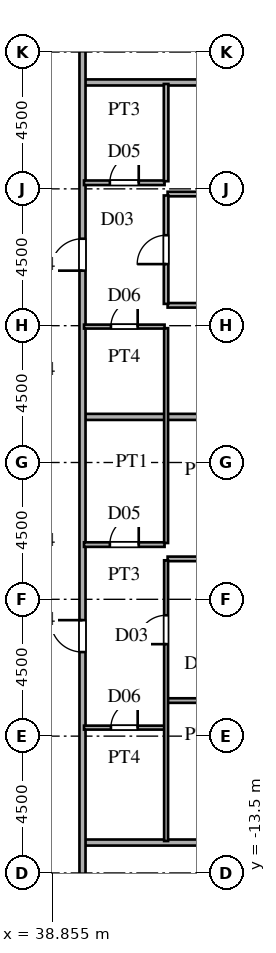
"""IFC4 building model, lengths in metres.
Left out: names, types, materials, properties, quantities, classifications, styles, units other than length and angle.
Written with IfcOpenShell. Run it as: python <this file> out.ifc"""

import sys

from ifc_helpers import new_model, si_unit, direction, frame, frame_2d, origin, place, context, subcontext, project, spatial, rectangle, extrude, source, transform, mapped, element, fill, save


model = new_model("IFC4")
c1 = context("Model", 3, precision=1e-05, world=origin(), true_north=direction((0.0, 1.0)))
c2 = subcontext(c1, "Body", "Model", "MODEL_VIEW")
j1 = project(units=[si_unit("LENGTHUNIT", "METRE"), si_unit("PLANEANGLEUNIT", "RADIAN")], contexts=[c1])
p1 = place(None, origin())
s1 = spatial("IfcSite", under=j1, at=p1, CompositionType="ELEMENT")
p2 = place(p1, origin())
s2 = spatial("IfcBuilding", under=s1, at=p2, CompositionType="ELEMENT")
p3 = place(p2, frame((0.0, 0.0, 51.3)))
s3 = spatial("IfcBuildingStorey", under=s2, at=p3, CompositionType="ELEMENT", Elevation=51.3)
p4 = place(p3, frame((39.93, -12.5, 0.0), z_axis=(0.0, 0.0, 1.0), x_axis=(1.0, 0.0, 0.0)))
e1 = element("IfcWall", 1, at=p4, inside=s3, PredefinedType="PARTITIONING", context=c2, shape_type="SweptSolid", body=[
    extrude(rectangle(XDim=26.407, YDim=0.2, at=frame_2d((13.204, 0.0))), origin(), (0.0, 0.0, 1.0), 3.38),
])
p5 = place(p3, frame((39.9, -8.72, 0.0), z_axis=(0.0, 0.0, 1.0), x_axis=(1.0, 0.0, 0.0)))
e2 = element("IfcWall", 2, at=p5, inside=s3, PredefinedType="PARTITIONING", context=c2, shape_type="SweptSolid", body=[
    extrude(rectangle(XDim=2.65, YDim=0.13, at=frame_2d((1.325, 0.0))), origin(), (0.0, 0.0, 1.0), 3.38),
])
p6 = place(p5, frame((0.885, 0.0, 0.0)))
e3 = element("IfcOpeningElement", 3, at=p6, cuts=e2, PredefinedType="OPENING", context=c2, shape_type="SweptSolid", body=[
    extrude(rectangle(XDim=0.88, YDim=2.1, at=frame_2d((0.44, 1.05))), frame((0.0, 0.075, 0.0), z_axis=(0.0, -1.0, 0.0), x_axis=(1.0, 0.0, 0.0)), (0.0, 0.0, 1.0), 0.15),
])
p7 = place(p3, frame((42.65, -7.83, 0.0), z_axis=(0.0, 0.0, 1.0), x_axis=(1.0, 0.0, 0.0)))
e4 = element("IfcWall", 4, at=p7, inside=s3, PredefinedType="PARTITIONING", context=c2, shape_type="SweptSolid", body=[
    extrude(rectangle(XDim=29.885, YDim=0.15, at=frame_2d((14.942, 0.0))), origin(), (0.0, 0.0, 1.0), 3.38),
])
p8 = place(p7, frame((5.425, 0.0, 0.0)))
e5 = element("IfcOpeningElement", 5, at=p8, cuts=e4, PredefinedType="OPENING", context=c2, shape_type="SweptSolid", body=[
    extrude(rectangle(XDim=0.95, YDim=2.15, at=frame_2d((0.475, 1.075))), frame((0.0, 0.085, 0.0), z_axis=(0.0, -1.0, 0.0), x_axis=(1.0, 0.0, 0.0)), (0.0, 0.0, 1.0), 0.17),
])
p9 = place(p7, frame((14.225, 0.0, 0.0)))
e6 = element("IfcOpeningElement", 6, at=p9, cuts=e4, PredefinedType="OPENING", context=c2, shape_type="SweptSolid", body=[
    extrude(rectangle(XDim=0.95, YDim=2.15, at=frame_2d((0.475, 1.075))), frame((0.0, 0.085, 0.0), z_axis=(0.0, -1.0, 0.0), x_axis=(1.0, 0.0, 0.0)), (0.0, 0.0, 1.0), 0.17),
])
p10 = place(p3, frame((42.65, -3.17, 0.0), z_axis=(0.0, 0.0, 1.0), x_axis=(1.0, 0.0, 0.0)))
e7 = element("IfcWall", 7, at=p10, inside=s3, PredefinedType="PARTITIONING", context=c2, shape_type="SweptSolid", body=[
    extrude(rectangle(XDim=29.885, YDim=0.15, at=frame_2d((14.942, 0.0))), origin(), (0.0, 0.0, 1.0), 3.38),
])
p11 = place(p10, frame((5.425, 0.0, 0.0)))
e8 = element("IfcOpeningElement", 8, at=p11, cuts=e7, PredefinedType="OPENING", context=c2, shape_type="SweptSolid", body=[
    extrude(rectangle(XDim=0.95, YDim=2.15, at=frame_2d((0.475, 1.075))), frame((0.0, 0.085, 0.0), z_axis=(0.0, -1.0, 0.0), x_axis=(1.0, 0.0, 0.0)), (0.0, 0.0, 1.0), 0.17),
])
p12 = place(p10, frame((14.225, 0.0, 0.0)))
e9 = element("IfcOpeningElement", 9, at=p12, cuts=e7, PredefinedType="OPENING", context=c2, shape_type="SweptSolid", body=[
    extrude(rectangle(XDim=0.95, YDim=2.15, at=frame_2d((0.475, 1.075))), frame((0.0, 0.085, 0.0), z_axis=(0.0, -1.0, 0.0), x_axis=(1.0, 0.0, 0.0)), (0.0, 0.0, 1.0), 0.17),
])
p13 = place(p3, frame((39.9, -2.7, 0.0), z_axis=(0.0, 0.0, 1.0), x_axis=(1.0, 0.0, 0.0)))
e10 = element("IfcWall", 10, at=p13, inside=s3, PredefinedType="PARTITIONING", context=c2, shape_type="SweptSolid", body=[
    extrude(rectangle(XDim=2.65, YDim=0.15, at=frame_2d((1.325, 0.0))), origin(), (0.0, 0.0, 1.0), 3.38),
])
p14 = place(p13, frame((0.85, 0.0, 0.0)))
e11 = element("IfcOpeningElement", 11, at=p14, cuts=e10, PredefinedType="OPENING", context=c2, shape_type="SweptSolid", body=[
    extrude(rectangle(XDim=0.95, YDim=2.15, at=frame_2d((0.475, 1.075))), frame((0.0, 0.085, 0.0), z_axis=(0.0, -1.0, 0.0), x_axis=(1.0, 0.0, 0.0)), (0.0, 0.0, 1.0), 0.17),
])
p15 = place(p3, frame((39.93, 1.5, 0.0), z_axis=(0.0, 0.0, 1.0), x_axis=(1.0, 0.0, 0.0)))
e12 = element("IfcWall", 12, at=p15, inside=s3, PredefinedType="PARTITIONING", context=c2, shape_type="SweptSolid", body=[
    extrude(rectangle(XDim=32.575, YDim=0.2, at=frame_2d((16.288, 0.0))), origin(), (0.0, 0.0, 1.0), 3.38),
])
p16 = place(p3, frame((39.9, 4.47, 0.0), z_axis=(0.0, 0.0, 1.0), x_axis=(1.0, 0.0, 0.0)))
e13 = element("IfcWall", 13, at=p16, inside=s3, PredefinedType="PARTITIONING", context=c2, shape_type="SweptSolid", body=[
    extrude(rectangle(XDim=2.65, YDim=0.13, at=frame_2d((1.325, 0.0))), origin(), (0.0, 0.0, 1.0), 2.68),
])
p17 = place(p16, frame((0.885, 0.0, 0.0)))
e14 = element("IfcOpeningElement", 14, at=p17, cuts=e13, PredefinedType="OPENING", context=c2, shape_type="SweptSolid", body=[
    extrude(rectangle(XDim=0.88, YDim=2.1, at=frame_2d((0.44, 1.05))), frame((0.0, 0.075, 0.0), z_axis=(0.0, -1.0, 0.0), x_axis=(1.0, 0.0, 0.0)), (0.0, 0.0, 1.0), 0.15),
])
p18 = place(p3, frame((42.65, 5.17, 0.0), z_axis=(0.0, 0.0, 1.0), x_axis=(1.0, 0.0, 0.0)))
e15 = element("IfcWall", 15, at=p18, inside=s3, PredefinedType="PARTITIONING", context=c2, shape_type="SweptSolid", body=[
    extrude(rectangle(XDim=29.885, YDim=0.15, at=frame_2d((14.942, 0.0))), origin(), (0.0, 0.0, 1.0), 3.38),
])
p19 = place(p18, frame((5.425, 0.0, 0.0)))
e16 = element("IfcOpeningElement", 16, at=p19, cuts=e15, PredefinedType="OPENING", context=c2, shape_type="SweptSolid", body=[
    extrude(rectangle(XDim=0.95, YDim=2.15, at=frame_2d((0.475, 1.075))), frame((0.0, 0.085, 0.0), z_axis=(0.0, -1.0, 0.0), x_axis=(1.0, 0.0, 0.0)), (0.0, 0.0, 1.0), 0.17),
])
p20 = place(p18, frame((14.225, 0.0, 0.0)))
e17 = element("IfcOpeningElement", 17, at=p20, cuts=e15, PredefinedType="OPENING", context=c2, shape_type="SweptSolid", body=[
    extrude(rectangle(XDim=0.95, YDim=2.15, at=frame_2d((0.475, 1.075))), frame((0.0, 0.085, 0.0), z_axis=(0.0, -1.0, 0.0), x_axis=(1.0, 0.0, 0.0)), (0.0, 0.0, 1.0), 0.17),
])
p21 = place(p3, frame((42.65, 8.83, 0.0), z_axis=(0.0, 0.0, 1.0), x_axis=(1.0, 0.0, 0.0)))
e18 = element("IfcWall", 18, at=p21, inside=s3, PredefinedType="PARTITIONING", context=c2, shape_type="SweptSolid", body=[
    extrude(rectangle(XDim=29.885, YDim=0.15, at=frame_2d((14.942, 0.0))), origin(), (0.0, 0.0, 1.0), 3.38),
])
p22 = place(p21, frame((5.425, 0.0, 0.0)))
e19 = element("IfcOpeningElement", 19, at=p22, cuts=e18, PredefinedType="OPENING", context=c2, shape_type="SweptSolid", body=[
    extrude(rectangle(XDim=0.95, YDim=2.15, at=frame_2d((0.475, 1.075))), frame((0.0, 0.085, 0.0), z_axis=(0.0, -1.0, 0.0), x_axis=(1.0, 0.0, 0.0)), (0.0, 0.0, 1.0), 0.17),
])
p23 = place(p21, frame((23.225, 0.0, 0.0)))
e20 = element("IfcOpeningElement", 20, at=p23, cuts=e18, PredefinedType="OPENING", context=c2, shape_type="SweptSolid", body=[
    extrude(rectangle(XDim=0.95, YDim=2.15, at=frame_2d((0.475, 1.075))), frame((0.0, 0.085, 0.0), z_axis=(0.0, -1.0, 0.0), x_axis=(1.0, 0.0, 0.0)), (0.0, 0.0, 1.0), 0.17),
])
p24 = place(p21, frame((14.225, 0.0, 0.0)))
e21 = element("IfcOpeningElement", 21, at=p24, cuts=e18, PredefinedType="OPENING", context=c2, shape_type="SweptSolid", body=[
    extrude(rectangle(XDim=0.95, YDim=2.15, at=frame_2d((0.475, 1.075))), frame((0.0, 0.085, 0.0), z_axis=(0.0, -1.0, 0.0), x_axis=(1.0, 0.0, 0.0)), (0.0, 0.0, 1.0), 0.17),
])
p25 = place(p3, frame((39.9, 9.2, 0.0), z_axis=(0.0, 0.0, 1.0), x_axis=(1.0, 0.0, 0.0)))
e22 = element("IfcWall", 22, at=p25, inside=s3, PredefinedType="PARTITIONING", context=c2, shape_type="SweptSolid", body=[
    extrude(rectangle(XDim=2.65, YDim=0.15, at=frame_2d((1.325, 0.0))), origin(), (0.0, 0.0, 1.0), 3.38),
])
p26 = place(p25, frame((0.85, 0.0, 0.0)))
e23 = element("IfcOpeningElement", 23, at=p26, cuts=e22, PredefinedType="OPENING", context=c2, shape_type="SweptSolid", body=[
    extrude(rectangle(XDim=0.95, YDim=2.15, at=frame_2d((0.475, 1.075))), frame((0.0, 0.085, 0.0), z_axis=(0.0, -1.0, 0.0), x_axis=(1.0, 0.0, 0.0)), (0.0, 0.0, 1.0), 0.17),
])
p27 = place(p3, frame((39.93, 12.5, 0.0), z_axis=(0.0, 0.0, 1.0), x_axis=(1.0, 0.0, 0.0)))
e24 = element("IfcWall", 24, at=p27, inside=s3, PredefinedType="PARTITIONING", context=c2, shape_type="SweptSolid", body=[
    extrude(rectangle(XDim=26.407, YDim=0.2, at=frame_2d((13.204, 0.0))), origin(), (0.0, 0.0, 1.0), 3.38),
])
p28 = place(p3, frame((39.85, -15.515, 0.0), z_axis=(0.0, 0.0, 1.0), x_axis=(0.0, 1.0, 0.0)))
e25 = element("IfcWall", 25, at=p28, inside=s3, PredefinedType="PARTITIONING", context=c2, shape_type="SweptSolid", body=[
    extrude(rectangle(XDim=31.03, YDim=0.2, at=frame_2d((15.515, 0.0))), origin(), (0.0, 0.0, 1.0), 3.38),
])
p29 = place(p28, frame((0.94, 0.0, 0.0)))
e26 = element("IfcOpeningElement", 26, at=p29, cuts=e25, PredefinedType="OPENING", context=c2, shape_type="SweptSolid", body=[
    extrude(rectangle(XDim=1.05, YDim=2.25, at=frame_2d((0.525, 1.125))), frame((0.0, 0.11, 0.0), z_axis=(0.0, -1.0, 0.0), x_axis=(1.0, 0.0, 0.0)), (0.0, 0.0, 1.0), 0.22),
])
p30 = place(p28, frame((9.28, 0.0, 0.0)))
e27 = element("IfcOpeningElement", 27, at=p30, cuts=e25, PredefinedType="OPENING", context=c2, shape_type="SweptSolid", body=[
    extrude(rectangle(XDim=1.05, YDim=2.25, at=frame_2d((0.525, 1.125))), frame((0.0, 0.11, 0.0), z_axis=(0.0, -1.0, 0.0), x_axis=(1.0, 0.0, 0.0)), (0.0, 0.0, 1.0), 0.22),
])
p31 = place(p28, frame((21.825, 0.0, 0.0)))
e28 = element("IfcOpeningElement", 28, at=p31, cuts=e25, PredefinedType="OPENING", context=c2, shape_type="SweptSolid", body=[
    extrude(rectangle(XDim=1.05, YDim=2.25, at=frame_2d((0.525, 1.125))), frame((0.0, 0.11, 0.0), z_axis=(0.0, -1.0, 0.0), x_axis=(1.0, 0.0, 0.0)), (0.0, 0.0, 1.0), 0.22),
])
p32 = place(p28, frame((29.04, 0.0, 0.0)))
e29 = element("IfcOpeningElement", 29, at=p32, cuts=e25, PredefinedType="OPENING", context=c2, shape_type="SweptSolid", body=[
    extrude(rectangle(XDim=1.05, YDim=2.25, at=frame_2d((0.525, 1.125))), frame((0.0, 0.11, 0.0), z_axis=(0.0, -1.0, 0.0), x_axis=(1.0, 0.0, 0.0)), (0.0, 0.0, 1.0), 0.22),
])
p33 = place(p3, frame((42.6, -12.45, 0.0), z_axis=(0.0, 0.0, 1.0), x_axis=(0.0, 1.0, 0.0)))
e30 = element("IfcWall", 30, at=p33, inside=s3, PredefinedType="PARTITIONING", context=c2, shape_type="SweptSolid", body=[
    extrude(rectangle(XDim=9.233, YDim=0.13, at=frame_2d((4.616, 0.0))), origin(), (0.0, 0.0, 1.0), 3.38),
])
p34 = place(p33, frame((6.475, 0.0, 0.0)))
e31 = element("IfcOpeningElement", 31, at=p34, cuts=e30, PredefinedType="OPENING", context=c2, shape_type="SweptSolid", body=[
    extrude(rectangle(XDim=0.95, YDim=2.15, at=frame_2d((0.475, 1.075))), frame((0.0, 0.075, 0.0), z_axis=(0.0, -1.0, 0.0), x_axis=(1.0, 0.0, 0.0)), (0.0, 0.0, 1.0), 0.15),
])
p35 = place(p3, frame((42.6, -2.648, 0.0), z_axis=(0.0, 0.0, 1.0), x_axis=(0.0, 1.0, 0.0)))
e32 = element("IfcWall", 32, at=p35, inside=s3, PredefinedType="PARTITIONING", context=c2, shape_type="SweptSolid", body=[
    extrude(rectangle(XDim=7.066, YDim=0.13, at=frame_2d((3.533, 0.0))), origin(), (0.0, 0.0, 1.0), 3.38),
])
p36 = place(p3, frame((42.6, 5.217, 0.0), z_axis=(0.0, 0.0, 1.0), x_axis=(0.0, 1.0, 0.0)))
e33 = element("IfcWall", 33, at=p36, inside=s3, PredefinedType="PARTITIONING", context=c2, shape_type="SweptSolid", body=[
    extrude(rectangle(XDim=3.566, YDim=0.15, at=frame_2d((1.783, 0.0))), origin(), (0.0, 0.0, 1.0), 3.38),
])
p37 = place(p36, frame((1.308, 0.0, 0.0)))
e34 = element("IfcOpeningElement", 34, at=p37, cuts=e33, PredefinedType="OPENING", context=c2, shape_type="SweptSolid", body=[
    extrude(rectangle(XDim=0.95, YDim=2.15, at=frame_2d((0.475, 1.075))), frame((0.0, 0.085, 0.0), z_axis=(0.0, -1.0, 0.0), x_axis=(1.0, 0.0, 0.0)), (0.0, 0.0, 1.0), 0.17),
])
p38 = place(p3, frame((42.6, 9.252, 0.0), z_axis=(0.0, 0.0, 1.0), x_axis=(0.0, 1.0, 0.0)))
e35 = element("IfcWall", 35, at=p38, inside=s3, PredefinedType="PARTITIONING", context=c2, shape_type="SweptSolid", body=[
    extrude(rectangle(XDim=3.198, YDim=0.15, at=frame_2d((1.599, 0.0))), origin(), (0.0, 0.0, 1.0), 3.38),
])
m1 = source(origin(), c2, "Body", "SweptSolid", [
    extrude(rectangle(XDim=0.88, YDim=2.1, at=frame_2d((0.44, 1.05))), frame((0.0, 0.025, 0.0), z_axis=(0.0, -1.0, 0.0), x_axis=(1.0, 0.0, 0.0)), (0.0, 0.0, 1.0), 0.05),
])
p39 = place(p6, origin())
e36 = element("IfcDoor", 36, at=p39, inside=s3, OperationType="SINGLE_SWING_RIGHT", PredefinedType="DOOR", context=c2, shape_type="MappedRepresentation", body=[
    mapped(m1, transform((0.0, 0.0, 0.0), scale=1.0)),
])
fill(e3, e36)
m2 = source(origin(), c2, "Body", "SweptSolid", [
    extrude(rectangle(XDim=0.95, YDim=2.15, at=frame_2d((0.475, 1.075))), frame((0.0, 0.025, 0.0), z_axis=(0.0, -1.0, 0.0), x_axis=(1.0, 0.0, 0.0)), (0.0, 0.0, 1.0), 0.05),
])
p40 = place(p14, origin())
e37 = element("IfcDoor", 37, at=p40, inside=s3, OperationType="SINGLE_SWING_RIGHT", PredefinedType="DOOR", context=c2, shape_type="MappedRepresentation", body=[
    mapped(m2, transform((0.0, 0.0, 0.0), scale=1.0)),
])
fill(e11, e37)
p41 = place(p17, origin())
e38 = element("IfcDoor", 38, at=p41, inside=s3, OperationType="SINGLE_SWING_RIGHT", PredefinedType="DOOR", context=c2, shape_type="MappedRepresentation", body=[
    mapped(m1, transform((0.0, 0.0, 0.0), scale=1.0)),
])
fill(e14, e38)
p42 = place(p26, origin())
e39 = element("IfcDoor", 39, at=p42, inside=s3, OperationType="SINGLE_SWING_RIGHT", PredefinedType="DOOR", context=c2, shape_type="MappedRepresentation", body=[
    mapped(m2, transform((0.0, 0.0, 0.0), scale=1.0)),
])
fill(e23, e39)
m3 = source(origin(), c2, "Body", "SweptSolid", [
    extrude(rectangle(XDim=1.05, YDim=2.25, at=frame_2d((0.525, 1.125))), frame((0.0, 0.025, 0.0), z_axis=(0.0, -1.0, 0.0), x_axis=(1.0, 0.0, 0.0)), (0.0, 0.0, 1.0), 0.05),
])
p43 = place(p30, origin())
e40 = element("IfcDoor", 40, at=p43, inside=s3, OperationType="SINGLE_SWING_RIGHT", PredefinedType="DOOR", context=c2, shape_type="MappedRepresentation", body=[
    mapped(m3, transform((0.0, 0.0, 0.0), scale=1.0)),
])
fill(e27, e40)
p44 = place(p31, origin())
e41 = element("IfcDoor", 41, at=p44, inside=s3, OperationType="SINGLE_SWING_LEFT", PredefinedType="DOOR", context=c2, shape_type="MappedRepresentation", body=[
    mapped(m3, transform((0.0, 0.0, 0.0), scale=1.0)),
])
fill(e28, e41)
p45 = place(p34, origin())
e42 = element("IfcDoor", 42, at=p45, inside=s3, OperationType="SINGLE_SWING_LEFT", PredefinedType="DOOR", context=c2, shape_type="MappedRepresentation", body=[
    mapped(m2, transform((0.0, 0.0, 0.0), scale=1.0)),
])
fill(e31, e42)
p46 = place(p37, origin())
e43 = element("IfcDoor", 43, at=p46, inside=s3, OperationType="SINGLE_SWING_LEFT", PredefinedType="DOOR", context=c2, shape_type="MappedRepresentation", body=[
    mapped(m2, transform((0.0, 0.0, 0.0), scale=1.0)),
])
fill(e34, e43)
save(model, sys.argv[1])
